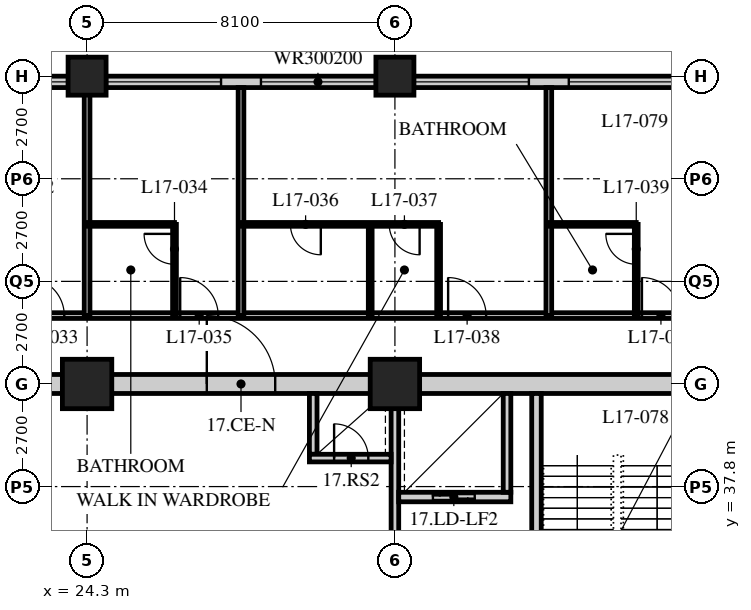
"""IFC4 building model, lengths in metres.
Left out: names, types, materials, properties, quantities, classifications, styles, units other than length and angle.
Written with IfcOpenShell. Run it as: python <this file> out.ifc"""

import sys

from ifc_helpers import new_model, si_unit, direction, frame, frame_2d, origin, origin_2d, place, context, subcontext, project, spatial, rectangle, hollow_rectangle, extrude, element, fill, save


model = new_model("IFC4")
c1 = context("Model", 3, precision=1e-05, world=origin(), true_north=direction((0.0, 1.0)))
c2 = subcontext(c1, "Body", "Model", "MODEL_VIEW")
j1 = project(units=[si_unit("LENGTHUNIT", "METRE"), si_unit("PLANEANGLEUNIT", "RADIAN")], contexts=[c1])
p1 = place(None, origin())
s1 = spatial("IfcSite", under=j1, at=p1, CompositionType="ELEMENT")
p2 = place(p1, origin())
s2 = spatial("IfcBuilding", under=s1, at=p2, CompositionType="ELEMENT")
p3 = place(p2, frame((0.0, 0.0, 70.4)))
s3 = spatial("IfcBuildingStorey", under=s2, at=p3, CompositionType="ELEMENT", Elevation=70.4)
p4 = place(p3, frame((24.3, 40.5, 0.0), z_axis=(0.0, 0.0, 1.0), x_axis=(1.0, 0.0, 0.0)))
e1 = element("IfcColumn", 1, at=p4, inside=s3, PredefinedType="COLUMN", context=c2, shape_type="SweptSolid", body=[
    extrude(hollow_rectangle(XDim=1.3, YDim=1.3, WallThickness=0.13, at=origin_2d()), origin(), (0.0, 0.0, 1.0), 3.4),
])
p5 = place(p3, frame((24.3, 48.6, 0.0), z_axis=(0.0, 0.0, 1.0), x_axis=(1.0, 0.0, 0.0)))
e2 = element("IfcColumn", 2, at=p5, inside=s3, PredefinedType="COLUMN", context=c2, shape_type="SweptSolid", body=[
    extrude(hollow_rectangle(XDim=1.0, YDim=1.0, WallThickness=0.1, at=origin_2d()), origin(), (0.0, 0.0, 1.0), 3.4),
])
p6 = place(p3, frame((32.4, 40.5, 0.0), z_axis=(0.0, 0.0, 1.0), x_axis=(1.0, 0.0, 0.0)))
e3 = element("IfcColumn", 3, at=p6, inside=s3, PredefinedType="COLUMN", context=c2, shape_type="SweptSolid", body=[
    extrude(hollow_rectangle(XDim=1.3, YDim=1.3, WallThickness=0.13, at=origin_2d()), origin(), (0.0, 0.0, 1.0), 3.4),
])
p7 = place(p3, frame((32.4, 48.6, 0.0), z_axis=(0.0, 0.0, 1.0), x_axis=(1.0, 0.0, 0.0)))
e4 = element("IfcColumn", 4, at=p7, inside=s3, PredefinedType="COLUMN", context=c2, shape_type="SweptSolid", body=[
    extrude(hollow_rectangle(XDim=1.0, YDim=1.0, WallThickness=0.1, at=origin_2d()), origin(), (0.0, 0.0, 1.0), 3.4),
])
p8 = place(p3, frame((48.3, 48.45, 0.0), z_axis=(0.0, 0.0, 1.0), x_axis=(-1.0, 0.0, 0.0)))
e5 = element("IfcWall", 5, at=p8, inside=s3, PredefinedType="SOLIDWALL", context=c2, shape_type="SweptSolid", body=[
    extrude(rectangle(XDim=40.2, YDim=0.3, at=frame_2d((20.1, 0.0))), origin(), (0.0, 0.0, 1.0), 3.19),
])
p9 = place(p8, frame((0.225, 0.0, 0.9)))
e6 = element("IfcOpeningElement", 6, at=p9, cuts=e5, PredefinedType="OPENING", context=c2, shape_type="SweptSolid", body=[
    extrude(rectangle(XDim=3.0, YDim=2.0, at=frame_2d((1.5, 1.0))), frame((0.0, 0.16, 0.0), z_axis=(0.0, -1.0, 0.0), x_axis=(1.0, 0.0, 0.0)), (0.0, 0.0, 1.0), 0.32),
])
p10 = place(p8, frame((4.275, 0.0, 0.9)))
e7 = element("IfcOpeningElement", 7, at=p10, cuts=e5, PredefinedType="OPENING", context=c2, shape_type="SweptSolid", body=[
    extrude(rectangle(XDim=3.0, YDim=2.0, at=frame_2d((1.5, 1.0))), frame((0.0, 0.16, 0.0), z_axis=(0.0, -1.0, 0.0), x_axis=(1.0, 0.0, 0.0)), (0.0, 0.0, 1.0), 0.32),
])
p11 = place(p8, frame((8.325, 0.0, 0.9)))
e8 = element("IfcOpeningElement", 8, at=p11, cuts=e5, PredefinedType="OPENING", context=c2, shape_type="SweptSolid", body=[
    extrude(rectangle(XDim=3.0, YDim=2.0, at=frame_2d((1.5, 1.0))), frame((0.0, 0.16, 0.0), z_axis=(0.0, -1.0, 0.0), x_axis=(1.0, 0.0, 0.0)), (0.0, 0.0, 1.0), 0.32),
])
p12 = place(p8, frame((12.375, 0.0, 0.9)))
e9 = element("IfcOpeningElement", 9, at=p12, cuts=e5, PredefinedType="OPENING", context=c2, shape_type="SweptSolid", body=[
    extrude(rectangle(XDim=3.0, YDim=2.0, at=frame_2d((1.5, 1.0))), frame((0.0, 0.16, 0.0), z_axis=(0.0, -1.0, 0.0), x_axis=(1.0, 0.0, 0.0)), (0.0, 0.0, 1.0), 0.32),
])
p13 = place(p8, frame((16.425, 0.0, 0.9)))
e10 = element("IfcOpeningElement", 10, at=p13, cuts=e5, PredefinedType="OPENING", context=c2, shape_type="SweptSolid", body=[
    extrude(rectangle(XDim=3.0, YDim=2.0, at=frame_2d((1.5, 1.0))), frame((0.0, 0.16, 0.0), z_axis=(0.0, -1.0, 0.0), x_axis=(1.0, 0.0, 0.0)), (0.0, 0.0, 1.0), 0.32),
])
p14 = place(p8, frame((20.475, 0.0, 0.9)))
e11 = element("IfcOpeningElement", 11, at=p14, cuts=e5, PredefinedType="OPENING", context=c2, shape_type="SweptSolid", body=[
    extrude(rectangle(XDim=3.0, YDim=2.0, at=frame_2d((1.5, 1.0))), frame((0.0, 0.16, 0.0), z_axis=(0.0, -1.0, 0.0), x_axis=(1.0, 0.0, 0.0)), (0.0, 0.0, 1.0), 0.32),
])
p15 = place(p8, frame((24.525, 0.0, 0.9)))
e12 = element("IfcOpeningElement", 12, at=p15, cuts=e5, PredefinedType="OPENING", context=c2, shape_type="SweptSolid", body=[
    extrude(rectangle(XDim=3.0, YDim=2.0, at=frame_2d((1.5, 1.0))), frame((0.0, 0.16, 0.0), z_axis=(0.0, -1.0, 0.0), x_axis=(1.0, 0.0, 0.0)), (0.0, 0.0, 1.0), 0.32),
])
p16 = place(p8, frame((28.575, 0.0, 0.9)))
e13 = element("IfcOpeningElement", 13, at=p16, cuts=e5, PredefinedType="OPENING", context=c2, shape_type="SweptSolid", body=[
    extrude(rectangle(XDim=3.0, YDim=2.0, at=frame_2d((1.5, 1.0))), frame((0.0, 0.16, 0.0), z_axis=(0.0, -1.0, 0.0), x_axis=(1.0, 0.0, 0.0)), (0.0, 0.0, 1.0), 0.32),
])
p17 = place(p8, frame((32.625, 0.0, 0.9)))
e14 = element("IfcOpeningElement", 14, at=p17, cuts=e5, PredefinedType="OPENING", context=c2, shape_type="SweptSolid", body=[
    extrude(rectangle(XDim=3.0, YDim=2.0, at=frame_2d((1.5, 1.0))), frame((0.0, 0.16, 0.0), z_axis=(0.0, -1.0, 0.0), x_axis=(1.0, 0.0, 0.0)), (0.0, 0.0, 1.0), 0.32),
])
p18 = place(p8, frame((36.675, 0.0, 0.9)))
e15 = element("IfcOpeningElement", 15, at=p18, cuts=e5, PredefinedType="OPENING", context=c2, shape_type="SweptSolid", body=[
    extrude(rectangle(XDim=3.0, YDim=2.0, at=frame_2d((1.5, 1.0))), frame((0.0, 0.16, 0.0), z_axis=(0.0, -1.0, 0.0), x_axis=(1.0, 0.0, 0.0)), (0.0, 0.0, 1.0), 0.32),
])
p19 = place(p3, frame((8.1, 42.3, 0.0), z_axis=(0.0, 0.0, 1.0), x_axis=(1.0, 0.0, 0.0)))
e16 = element("IfcWall", 16, at=p19, inside=s3, PredefinedType="PARTITIONING", context=c2, shape_type="SweptSolid", body=[
    extrude(rectangle(XDim=36.45, YDim=0.15, at=frame_2d((18.225, 0.0))), origin(), (0.0, 0.0, 1.0), 3.19),
])
p20 = place(p19, frame((9.5, 0.0, 0.0)))
e17 = element("IfcOpeningElement", 17, at=p20, cuts=e16, PredefinedType="OPENING", context=c2, shape_type="SweptSolid", body=[
    extrude(rectangle(XDim=1.0, YDim=2.1, at=frame_2d((0.5, 1.05))), frame((0.0, 0.085, 0.0), z_axis=(0.0, -1.0, 0.0), x_axis=(1.0, 0.0, 0.0)), (0.0, 0.0, 1.0), 0.17),
])
p21 = place(p19, frame((14.6, 0.0, 0.0)))
e18 = element("IfcOpeningElement", 18, at=p21, cuts=e16, PredefinedType="OPENING", context=c2, shape_type="SweptSolid", body=[
    extrude(rectangle(XDim=1.0, YDim=2.1, at=frame_2d((0.5, 1.05))), frame((0.0, 0.085, 0.0), z_axis=(0.0, -1.0, 0.0), x_axis=(1.0, 0.0, 0.0)), (0.0, 0.0, 1.0), 0.17),
])
p22 = place(p19, frame((18.65, 0.0, 0.0)))
e19 = element("IfcOpeningElement", 19, at=p22, cuts=e16, PredefinedType="OPENING", context=c2, shape_type="SweptSolid", body=[
    extrude(rectangle(XDim=1.0, YDim=2.1, at=frame_2d((0.5, 1.05))), frame((0.0, 0.085, 0.0), z_axis=(0.0, -1.0, 0.0), x_axis=(1.0, 0.0, 0.0)), (0.0, 0.0, 1.0), 0.17),
])
p23 = place(p19, frame((25.7, 0.0, 0.0)))
e20 = element("IfcOpeningElement", 20, at=p23, cuts=e16, PredefinedType="OPENING", context=c2, shape_type="SweptSolid", body=[
    extrude(rectangle(XDim=1.0, YDim=2.1, at=frame_2d((0.5, 1.05))), frame((0.0, 0.085, 0.0), z_axis=(0.0, -1.0, 0.0), x_axis=(1.0, 0.0, 0.0)), (0.0, 0.0, 1.0), 0.17),
])
p24 = place(p19, frame((30.8, 0.0, 0.0)))
e21 = element("IfcOpeningElement", 21, at=p24, cuts=e16, PredefinedType="OPENING", context=c2, shape_type="SweptSolid", body=[
    extrude(rectangle(XDim=1.0, YDim=2.1, at=frame_2d((0.5, 1.05))), frame((0.0, 0.085, 0.0), z_axis=(0.0, -1.0, 0.0), x_axis=(1.0, 0.0, 0.0)), (0.0, 0.0, 1.0), 0.17),
])
p25 = place(p19, frame((32.825, 0.0, 0.0)))
e22 = element("IfcOpeningElement", 22, at=p25, cuts=e16, PredefinedType="OPENING", context=c2, shape_type="SweptSolid", body=[
    extrude(rectangle(XDim=1.0, YDim=2.1, at=frame_2d((0.5, 1.05))), frame((0.0, 0.085, 0.0), z_axis=(0.0, -1.0, 0.0), x_axis=(1.0, 0.0, 0.0)), (0.0, 0.0, 1.0), 0.17),
])
p26 = place(p19, frame((2.625, 0.0, 0.0)))
e23 = element("IfcOpeningElement", 23, at=p26, cuts=e16, PredefinedType="OPENING", context=c2, shape_type="SweptSolid", body=[
    extrude(rectangle(XDim=1.0, YDim=2.1, at=frame_2d((0.5, 1.05))), frame((0.0, 0.085, 0.0), z_axis=(0.0, -1.0, 0.0), x_axis=(1.0, 0.0, 0.0)), (0.0, 0.0, 1.0), 0.17),
])
p27 = place(p3, frame((24.3, 42.3, 0.0), z_axis=(0.0, 0.0, 1.0), x_axis=(0.0, 1.0, 0.0)))
e24 = element("IfcWall", 24, at=p27, inside=s3, PredefinedType="PARTITIONING", context=c2, shape_type="SweptSolid", body=[
    extrude(rectangle(XDim=6.0, YDim=0.15, at=frame_2d((3.0, 0.0))), origin(), (0.0, 0.0, 1.0), 2.578),
])
p28 = place(p3, frame((24.3, 44.7, 0.0), z_axis=(0.0, 0.0, 1.0), x_axis=(1.0, 0.0, 0.0)))
e25 = element("IfcWall", 25, at=p28, inside=s3, PredefinedType="PARTITIONING", context=c2, shape_type="SweptSolid", body=[
    extrude(rectangle(XDim=2.3, YDim=0.1, at=frame_2d((1.15, 0.0))), origin(), (0.0, 0.0, 1.0), 3.19),
])
p29 = place(p3, frame((26.6, 42.3, 0.0), z_axis=(0.0, 0.0, 1.0), x_axis=(0.0, 1.0, 0.0)))
e26 = element("IfcWall", 26, at=p29, inside=s3, PredefinedType="PARTITIONING", context=c2, shape_type="SweptSolid", body=[
    extrude(rectangle(XDim=2.4, YDim=0.1, at=frame_2d((1.2, 0.0))), origin(), (0.0, 0.0, 1.0), 3.19),
])
p30 = place(p29, frame((1.35, 0.0, 0.0)))
e27 = element("IfcOpeningElement", 27, at=p30, cuts=e26, PredefinedType="OPENING", context=c2, shape_type="SweptSolid", body=[
    extrude(rectangle(XDim=0.8, YDim=2.1, at=frame_2d((0.4, 1.05))), frame((0.0, 0.06, 0.0), z_axis=(0.0, -1.0, 0.0), x_axis=(1.0, 0.0, 0.0)), (0.0, 0.0, 1.0), 0.12),
])
p31 = place(p3, frame((28.35, 42.3, 0.0), z_axis=(0.0, 0.0, 1.0), x_axis=(0.0, 1.0, 0.0)))
e28 = element("IfcWall", 28, at=p31, inside=s3, PredefinedType="PARTITIONING", context=c2, shape_type="SweptSolid", body=[
    extrude(rectangle(XDim=6.0, YDim=0.15, at=frame_2d((3.0, 0.0))), origin(), (0.0, 0.0, 1.0), 3.19),
])
p32 = place(p3, frame((28.35, 44.7, 0.0), z_axis=(0.0, 0.0, 1.0), x_axis=(1.0, 0.0, 0.0)))
e29 = element("IfcWall", 29, at=p32, inside=s3, PredefinedType="PARTITIONING", context=c2, shape_type="SweptSolid", body=[
    extrude(rectangle(XDim=5.2, YDim=0.1, at=frame_2d((2.6, 0.0))), origin(), (0.0, 0.0, 1.0), 3.19),
])
p33 = place(p32, frame((1.3, 0.0, 0.0)))
e30 = element("IfcOpeningElement", 30, at=p33, cuts=e29, PredefinedType="OPENING", context=c2, shape_type="SweptSolid", body=[
    extrude(rectangle(XDim=0.8, YDim=2.1, at=frame_2d((0.4, 1.05))), frame((0.0, 0.06, 0.0), z_axis=(0.0, -1.0, 0.0), x_axis=(1.0, 0.0, 0.0)), (0.0, 0.0, 1.0), 0.12),
])
p34 = place(p32, frame((3.9, 0.0, 0.0)))
e31 = element("IfcOpeningElement", 31, at=p34, cuts=e29, PredefinedType="OPENING", context=c2, shape_type="SweptSolid", body=[
    extrude(rectangle(XDim=0.8, YDim=2.1, at=frame_2d((0.4, 1.05))), frame((0.0, 0.06, 0.0), z_axis=(0.0, -1.0, 0.0), x_axis=(1.0, 0.0, 0.0)), (0.0, 0.0, 1.0), 0.12),
])
for number, where, z_axis, x_axis in (
    (32, (31.75, 42.3, 0.0), (0.0, 0.0, 1.0), (0.0, 1.0, 0.0)),
    (33, (33.55, 42.3, 0.0), (0.0, 0.0, 1.0), (0.0, 1.0, 0.0)),
):
    element("IfcWall", number, at=place(p3, frame(where, z_axis=z_axis, x_axis=x_axis)), inside=s3, PredefinedType="PARTITIONING", context=c2, shape_type="SweptSolid", body=[
        extrude(rectangle(XDim=2.4, YDim=0.1, at=frame_2d((1.2, 0.0))), origin(), (0.0, 0.0, 1.0), 3.19),
    ])
p35 = place(p3, frame((36.45, 42.3, 0.0), z_axis=(0.0, 0.0, 1.0), x_axis=(0.0, 1.0, 0.0)))
e34 = element("IfcWall", 34, at=p35, inside=s3, PredefinedType="PARTITIONING", context=c2, shape_type="SweptSolid", body=[
    extrude(rectangle(XDim=6.0, YDim=0.15, at=frame_2d((3.0, 0.0))), origin(), (0.0, 0.0, 1.0), 3.19),
])
p36 = place(p3, frame((36.45, 44.7, 0.0), z_axis=(0.0, 0.0, 1.0), x_axis=(1.0, 0.0, 0.0)))
e35 = element("IfcWall", 35, at=p36, inside=s3, PredefinedType="PARTITIONING", context=c2, shape_type="SweptSolid", body=[
    extrude(rectangle(XDim=2.3, YDim=0.1, at=frame_2d((1.15, 0.0))), origin(), (0.0, 0.0, 1.0), 3.19),
])
p37 = place(p3, frame((38.75, 42.3, 0.0), z_axis=(0.0, 0.0, 1.0), x_axis=(0.0, 1.0, 0.0)))
e36 = element("IfcWall", 36, at=p37, inside=s3, PredefinedType="PARTITIONING", context=c2, shape_type="SweptSolid", body=[
    extrude(rectangle(XDim=2.4, YDim=0.1, at=frame_2d((1.2, 0.0))), origin(), (0.0, 0.0, 1.0), 3.19),
])
p38 = place(p37, frame((1.35, 0.0, 0.0)))
e37 = element("IfcOpeningElement", 37, at=p38, cuts=e36, PredefinedType="OPENING", context=c2, shape_type="SweptSolid", body=[
    extrude(rectangle(XDim=0.8, YDim=2.1, at=frame_2d((0.4, 1.05))), frame((0.0, 0.06, 0.0), z_axis=(0.0, -1.0, 0.0), x_axis=(1.0, 0.0, 0.0)), (0.0, 0.0, 1.0), 0.12),
])
p39 = place(p3, frame((15.95, 40.5, 0.0), z_axis=(0.0, 0.0, 1.0), x_axis=(1.0, 0.0, 0.0)))
e38 = element("IfcWall", 38, at=p39, inside=s3, PredefinedType="SOLIDWALL", context=c2, shape_type="SweptSolid", body=[
    extrude(rectangle(XDim=24.8, YDim=0.5, at=frame_2d((12.4, 0.0))), origin(), (0.0, 0.0, 1.0), 2.54),
])
p40 = place(p39, frame((11.5, 0.0, 0.0)))
e39 = element("IfcOpeningElement", 39, at=p40, cuts=e38, PredefinedType="OPENING", context=c2, shape_type="SweptSolid", body=[
    extrude(rectangle(XDim=1.8, YDim=2.4, at=frame_2d((0.9, 1.2))), frame((0.0, 0.26, 0.0), z_axis=(0.0, -1.0, 0.0), x_axis=(1.0, 0.0, 0.0)), (0.0, 0.0, 1.0), 0.52),
])
p41 = place(p3, frame((32.4, 32.5, 0.0), z_axis=(0.0, 0.0, 1.0), x_axis=(0.0, 1.0, 0.0)))
e40 = element("IfcWall", 40, at=p41, inside=s3, PredefinedType="SOLIDWALL", context=c2, shape_type="SweptSolid", body=[
    extrude(rectangle(XDim=7.75, YDim=0.2, at=frame_2d((3.875, 0.0))), origin(), (0.0, 0.0, 1.0), 2.578),
])
p42 = place(p41, frame((1.9, 0.0, 0.0)))
e41 = element("IfcOpeningElement", 41, at=p42, cuts=e40, PredefinedType="OPENING", context=c2, shape_type="SweptSolid", body=[
    extrude(rectangle(XDim=1.2, YDim=2.1, at=frame_2d((0.6, 1.05))), frame((0.0, 0.11, 0.0), z_axis=(0.0, -1.0, 0.0), x_axis=(1.0, 0.0, 0.0)), (0.0, 0.0, 1.0), 0.22),
])
p43 = place(p3, frame((36.125, 32.5, 0.0), z_axis=(0.0, 0.0, 1.0), x_axis=(0.0, 1.0, 0.0)))
e42 = element("IfcWall", 42, at=p43, inside=s3, PredefinedType="SOLIDWALL", context=c2, shape_type="SweptSolid", body=[
    extrude(rectangle(XDim=7.75, YDim=0.25, at=frame_2d((3.875, 0.0))), origin(), (0.0, 0.0, 1.0), 3.19),
])
p44 = place(p43, frame((0.45, 0.0, 0.0)))
e43 = element("IfcOpeningElement", 43, at=p44, cuts=e42, PredefinedType="OPENING", context=c2, shape_type="SweptSolid", body=[
    extrude(rectangle(XDim=1.2, YDim=2.1, at=frame_2d((0.6, 1.05))), frame((0.0, 0.135, 0.0), z_axis=(0.0, -1.0, 0.0), x_axis=(1.0, 0.0, 0.0)), (0.0, 0.0, 1.0), 0.27),
])
p45 = place(p3, frame((32.5, 37.525, 0.0), z_axis=(0.0, 0.0, 1.0), x_axis=(1.0, 0.0, 0.0)))
e44 = element("IfcWall", 44, at=p45, inside=s3, PredefinedType="SOLIDWALL", context=c2, shape_type="SweptSolid", body=[
    extrude(rectangle(XDim=2.95, YDim=0.25, at=frame_2d((1.475, 0.0))), origin(), (0.0, 0.0, 1.0), 3.19),
])
p46 = place(p45, frame((0.9, 0.0, 0.0)))
e45 = element("IfcOpeningElement", 45, at=p46, cuts=e44, PredefinedType="OPENING", context=c2, shape_type="SweptSolid", body=[
    extrude(rectangle(XDim=1.1, YDim=2.4, at=frame_2d((0.55, 1.2))), frame((0.0, 0.135, 0.0), z_axis=(0.0, -1.0, 0.0), x_axis=(1.0, 0.0, 0.0)), (0.0, 0.0, 1.0), 0.27),
])
p47 = place(p3, frame((35.35, 37.65, 0.0), z_axis=(0.0, 0.0, 1.0), x_axis=(0.0, 1.0, 0.0)))
e46 = element("IfcWall", 46, at=p47, inside=s3, PredefinedType="SOLIDWALL", context=c2, shape_type="SweptSolid", body=[
    extrude(rectangle(XDim=2.6, YDim=0.2, at=frame_2d((1.3, 0.0))), origin(), (0.0, 0.0, 1.0), 3.19),
])
p48 = place(p3, frame((30.25, 38.65, 0.0), z_axis=(0.0, 0.0, 1.0), x_axis=(0.0, 1.0, 0.0)))
e47 = element("IfcWall", 47, at=p48, inside=s3, PredefinedType="SOLIDWALL", context=c2, shape_type="SweptSolid", body=[
    extrude(rectangle(XDim=1.6, YDim=0.2, at=frame_2d((0.8, 0.0))), origin(), (0.0, 0.0, 1.0), 3.19),
])
p49 = place(p3, frame((30.15, 38.55, 0.0), z_axis=(0.0, 0.0, 1.0), x_axis=(1.0, 0.0, 0.0)))
e48 = element("IfcWall", 48, at=p49, inside=s3, PredefinedType="SOLIDWALL", context=c2, shape_type="SweptSolid", body=[
    extrude(rectangle(XDim=2.15, YDim=0.2, at=frame_2d((1.075, 0.0))), origin(), (0.0, 0.0, 1.0), 3.19),
])
p50 = place(p49, frame((0.65, 0.0, 0.0)))
e49 = element("IfcOpeningElement", 49, at=p50, cuts=e48, PredefinedType="OPENING", context=c2, shape_type="SweptSolid", body=[
    extrude(rectangle(XDim=0.9, YDim=2.1, at=frame_2d((0.45, 1.05))), frame((0.0, 0.11, 0.0), z_axis=(0.0, -1.0, 0.0), x_axis=(1.0, 0.0, 0.0)), (0.0, 0.0, 1.0), 0.22),
])
p51 = place(p11, origin())
e50 = element("IfcWindow", 50, at=p51, inside=s3, PartitioningType="SINGLE_PANEL", PredefinedType="WINDOW", context=c2, shape_type="SweptSolid", body=[
    extrude(rectangle(XDim=3.0, YDim=2.0, at=frame_2d((1.5, 1.0))), frame((0.0, 0.03, 0.0), z_axis=(0.0, -1.0, 0.0), x_axis=(1.0, 0.0, 0.0)), (0.0, 0.0, 1.0), 0.06),
])
fill(e8, e50)
p52 = place(p12, origin())
e51 = element("IfcWindow", 51, at=p52, inside=s3, PartitioningType="SINGLE_PANEL", PredefinedType="WINDOW", context=c2, shape_type="SweptSolid", body=[
    extrude(rectangle(XDim=3.0, YDim=2.0, at=frame_2d((1.5, 1.0))), frame((0.0, 0.03, 0.0), z_axis=(0.0, -1.0, 0.0), x_axis=(1.0, 0.0, 0.0)), (0.0, 0.0, 1.0), 0.06),
])
fill(e9, e51)
p53 = place(p13, origin())
e52 = element("IfcWindow", 52, at=p53, inside=s3, PartitioningType="SINGLE_PANEL", PredefinedType="WINDOW", context=c2, shape_type="SweptSolid", body=[
    extrude(rectangle(XDim=3.0, YDim=2.0, at=frame_2d((1.5, 1.0))), frame((0.0, 0.03, 0.0), z_axis=(0.0, -1.0, 0.0), x_axis=(1.0, 0.0, 0.0)), (0.0, 0.0, 1.0), 0.06),
])
fill(e10, e52)
p54 = place(p14, origin())
e53 = element("IfcWindow", 53, at=p54, inside=s3, PartitioningType="SINGLE_PANEL", PredefinedType="WINDOW", context=c2, shape_type="SweptSolid", body=[
    extrude(rectangle(XDim=3.0, YDim=2.0, at=frame_2d((1.5, 1.0))), frame((0.0, 0.03, 0.0), z_axis=(0.0, -1.0, 0.0), x_axis=(1.0, 0.0, 0.0)), (0.0, 0.0, 1.0), 0.06),
])
fill(e11, e53)
p55 = place(p15, origin())
e54 = element("IfcWindow", 54, at=p55, inside=s3, PartitioningType="SINGLE_PANEL", PredefinedType="WINDOW", context=c2, shape_type="SweptSolid", body=[
    extrude(rectangle(XDim=3.0, YDim=2.0, at=frame_2d((1.5, 1.0))), frame((0.0, 0.03, 0.0), z_axis=(0.0, -1.0, 0.0), x_axis=(1.0, 0.0, 0.0)), (0.0, 0.0, 1.0), 0.06),
])
fill(e12, e54)
p56 = place(p21, origin())
e55 = element("IfcDoor", 55, at=p56, inside=s3, OperationType="SINGLE_SWING_LEFT", PredefinedType="DOOR", context=c2, shape_type="SweptSolid", body=[
    extrude(rectangle(XDim=1.0, YDim=2.1, at=frame_2d((0.5, 1.05))), frame((0.0, 0.025, 0.0), z_axis=(0.0, -1.0, 0.0), x_axis=(1.0, 0.0, 0.0)), (0.0, 0.0, 1.0), 0.05),
])
fill(e18, e55)
p57 = place(p30, origin())
e56 = element("IfcDoor", 56, at=p57, inside=s3, OperationType="SINGLE_SWING_RIGHT", PredefinedType="DOOR", context=c2, shape_type="SweptSolid", body=[
    extrude(rectangle(XDim=0.8, YDim=2.1, at=frame_2d((0.4, 1.05))), frame((0.0, 0.025, 0.0), z_axis=(0.0, -1.0, 0.0), x_axis=(1.0, 0.0, 0.0)), (0.0, 0.0, 1.0), 0.05),
])
fill(e27, e56)
p58 = place(p22, origin())
e57 = element("IfcDoor", 57, at=p58, inside=s3, OperationType="SINGLE_SWING_LEFT", PredefinedType="DOOR", context=c2, shape_type="SweptSolid", body=[
    extrude(rectangle(XDim=1.0, YDim=2.1, at=frame_2d((0.5, 1.05))), frame((0.0, 0.025, 0.0), z_axis=(0.0, -1.0, 0.0), x_axis=(1.0, 0.0, 0.0)), (0.0, 0.0, 1.0), 0.05),
])
fill(e19, e57)
p59 = place(p33, origin())
e58 = element("IfcDoor", 58, at=p59, inside=s3, OperationType="SINGLE_SWING_LEFT", PredefinedType="DOOR", context=c2, shape_type="SweptSolid", body=[
    extrude(rectangle(XDim=0.8, YDim=2.1, at=frame_2d((0.4, 1.05))), frame((0.0, 0.025, 0.0), z_axis=(0.0, -1.0, 0.0), x_axis=(1.0, 0.0, 0.0)), (0.0, 0.0, 1.0), 0.05),
])
fill(e30, e58)
p60 = place(p34, origin())
e59 = element("IfcDoor", 59, at=p60, inside=s3, OperationType="SINGLE_SWING_LEFT", PredefinedType="DOOR", context=c2, shape_type="SweptSolid", body=[
    extrude(rectangle(XDim=0.8, YDim=2.1, at=frame_2d((0.4, 1.05))), frame((0.0, 0.025, 0.0), z_axis=(0.0, -1.0, 0.0), x_axis=(1.0, 0.0, 0.0)), (0.0, 0.0, 1.0), 0.05),
])
fill(e31, e59)
p61 = place(p23, origin())
e60 = element("IfcDoor", 60, at=p61, inside=s3, OperationType="SINGLE_SWING_LEFT", PredefinedType="DOOR", context=c2, shape_type="SweptSolid", body=[
    extrude(rectangle(XDim=1.0, YDim=2.1, at=frame_2d((0.5, 1.05))), frame((0.0, 0.025, 0.0), z_axis=(0.0, -1.0, 0.0), x_axis=(1.0, 0.0, 0.0)), (0.0, 0.0, 1.0), 0.05),
])
fill(e20, e60)
p62 = place(p38, origin())
e61 = element("IfcDoor", 61, at=p62, inside=s3, OperationType="SINGLE_SWING_RIGHT", PredefinedType="DOOR", context=c2, shape_type="SweptSolid", body=[
    extrude(rectangle(XDim=0.8, YDim=2.1, at=frame_2d((0.4, 1.05))), frame((0.0, 0.025, 0.0), z_axis=(0.0, -1.0, 0.0), x_axis=(1.0, 0.0, 0.0)), (0.0, 0.0, 1.0), 0.05),
])
fill(e37, e61)
p63 = place(p24, origin())
e62 = element("IfcDoor", 62, at=p63, inside=s3, OperationType="SINGLE_SWING_LEFT", PredefinedType="DOOR", context=c2, shape_type="SweptSolid", body=[
    extrude(rectangle(XDim=1.0, YDim=2.1, at=frame_2d((0.5, 1.05))), frame((0.0, 0.025, 0.0), z_axis=(0.0, -1.0, 0.0), x_axis=(1.0, 0.0, 0.0)), (0.0, 0.0, 1.0), 0.05),
])
fill(e21, e62)
p64 = place(p50, origin())
e63 = element("IfcDoor", 63, at=p64, inside=s3, OperationType="SINGLE_SWING_LEFT", PredefinedType="DOOR", context=c2, shape_type="SweptSolid", body=[
    extrude(rectangle(XDim=0.9, YDim=2.1, at=frame_2d((0.45, 1.05))), frame((0.0, 0.025, 0.0), z_axis=(0.0, -1.0, 0.0), x_axis=(1.0, 0.0, 0.0)), (0.0, 0.0, 1.0), 0.05),
])
fill(e49, e63)
p65 = place(p46, origin())
e64 = element("IfcDoor", 64, at=p65, inside=s3, OperationType="DOUBLE_DOOR_SLIDING", PredefinedType="DOOR", context=c2, shape_type="SweptSolid", body=[
    extrude(rectangle(XDim=1.1, YDim=2.4, at=frame_2d((0.55, 1.2))), frame((0.0, 0.025, 0.0), z_axis=(0.0, -1.0, 0.0), x_axis=(1.0, 0.0, 0.0)), (0.0, 0.0, 1.0), 0.05),
])
fill(e45, e64)
p66 = place(p40, origin())
e65 = element("IfcDoor", 65, at=p66, inside=s3, OperationType="DOUBLE_DOOR_SINGLE_SWING", PredefinedType="DOOR", context=c2, shape_type="SweptSolid", body=[
    extrude(rectangle(XDim=1.8, YDim=2.4, at=frame_2d((0.9, 1.2))), frame((0.0, 0.025, 0.0), z_axis=(0.0, -1.0, 0.0), x_axis=(1.0, 0.0, 0.0)), (0.0, 0.0, 1.0), 0.05),
])
fill(e39, e65)
save(model, sys.argv[1])
